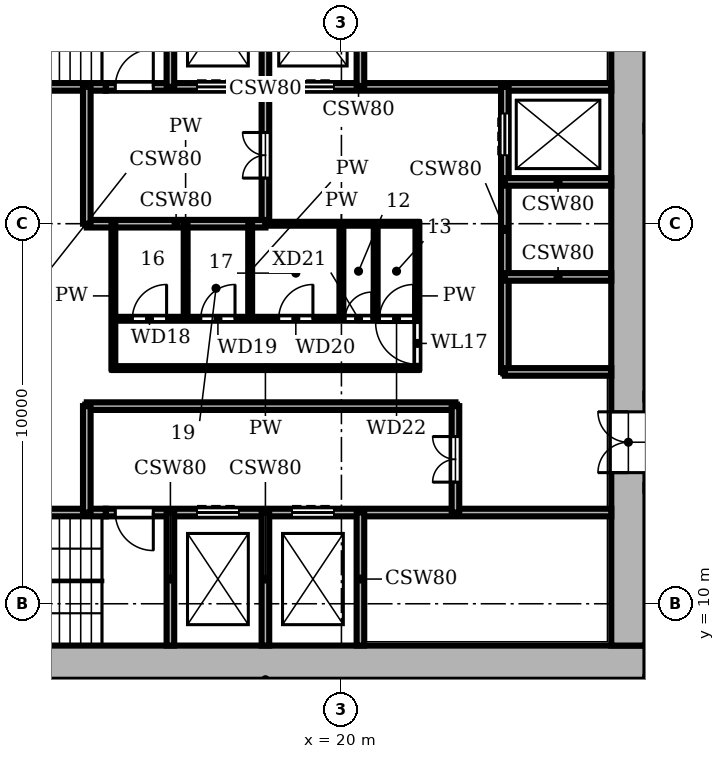
"""IFC4 building model, lengths in metres.
Left out: names, types, materials, properties, quantities, classifications, styles, units other than length and angle.
Written with IfcOpenShell. Run it as: python <this file> out.ifc"""

import sys

from ifc_helpers import new_model, si_unit, direction, frame, frame_2d, origin, place, context, subcontext, project, spatial, rectangle, extrude, element, fill, save


model = new_model("IFC4")
c1 = context("Model", 3, precision=1e-05, world=origin(), true_north=direction((0.0, 1.0)))
c2 = subcontext(c1, "Body", "Model", "MODEL_VIEW")
j1 = project(units=[si_unit("LENGTHUNIT", "METRE"), si_unit("PLANEANGLEUNIT", "RADIAN")], contexts=[c1])
p1 = place(None, origin())
s1 = spatial("IfcSite", under=j1, at=p1, CompositionType="ELEMENT")
p2 = place(p1, origin())
s2 = spatial("IfcBuilding", under=s1, at=p2, CompositionType="ELEMENT")
p3 = place(p2, frame((0.0, 0.0, 86.1)))
s3 = spatial("IfcBuildingStorey", under=s2, at=p3, CompositionType="ELEMENT", Elevation=86.1)
p4 = place(p3, frame((8.0, 8.45, 0.0), z_axis=(0.0, 0.0, 1.0), x_axis=(1.0, 0.0, 0.0)))
e1 = element("IfcWall", 1, at=p4, inside=s3, PredefinedType="SHEAR", context=c2, shape_type="SweptSolid", body=[
    extrude(rectangle(XDim=20.0, YDim=0.9, at=frame_2d((10.0, 0.0))), origin(), (0.0, 0.0, 1.0), 3.9),
])
p5 = place(p3, frame((27.55, 8.9, 0.0), z_axis=(0.0, 0.0, 1.0), x_axis=(0.0, 1.0, 0.0)))
e2 = element("IfcWall", 2, at=p5, inside=s3, PredefinedType="SHEAR", context=c2, shape_type="SweptSolid", body=[
    extrude(rectangle(XDim=18.2, YDim=0.9, at=frame_2d((9.1, 0.0))), origin(), (0.0, 0.0, 1.0), 3.9),
])
p6 = place(p5, frame((4.55, 0.0, 0.0)))
e3 = element("IfcOpeningElement", 3, at=p6, cuts=e2, PredefinedType="OPENING", context=c2, shape_type="SweptSolid", body=[
    extrude(rectangle(XDim=1.6, YDim=2.1, at=frame_2d((0.8, 1.05))), frame((0.0, 0.46, 0.0), z_axis=(0.0, -1.0, 0.0), x_axis=(1.0, 0.0, 0.0)), (0.0, 0.0, 1.0), 0.92),
])
p7 = place(p3, frame((8.9, 12.4, 0.0), z_axis=(0.0, 0.0, 1.0), x_axis=(1.0, 0.0, 0.0)))
e4 = element("IfcWall", 4, at=p7, inside=s3, PredefinedType="SHEAR", context=c2, shape_type="SweptSolid", body=[
    extrude(rectangle(XDim=4.9, YDim=0.2, at=frame_2d((2.45, 0.0))), origin(), (0.0, 0.0, 1.0), 3.58),
])
p8 = place(p3, frame((13.8, 12.4, 0.0), z_axis=(0.0, 0.0, 1.0), x_axis=(1.0, 0.0, 0.0)))
e5 = element("IfcWall", 5, at=p8, inside=s3, PredefinedType="SHEAR", context=c2, shape_type="SweptSolid", body=[
    extrude(rectangle(XDim=13.3, YDim=0.2, at=frame_2d((6.65, 0.0))), origin(), (0.0, 0.0, 1.0), 3.58),
])
p9 = place(p8, frame((2.4, 0.0, 0.0)))
e6 = element("IfcOpeningElement", 6, at=p9, cuts=e5, PredefinedType="OPENING", context=c2, shape_type="SweptSolid", body=[
    extrude(rectangle(XDim=1.1, YDim=2.1, at=frame_2d((0.55, 1.05))), frame((0.0, 0.11, 0.0), z_axis=(0.0, -1.0, 0.0), x_axis=(1.0, 0.0, 0.0)), (0.0, 0.0, 1.0), 0.22),
])
p10 = place(p8, frame((4.9, 0.0, 0.0)))
e7 = element("IfcOpeningElement", 7, at=p10, cuts=e5, PredefinedType="OPENING", context=c2, shape_type="SweptSolid", body=[
    extrude(rectangle(XDim=1.1, YDim=2.1, at=frame_2d((0.55, 1.05))), frame((0.0, 0.11, 0.0), z_axis=(0.0, -1.0, 0.0), x_axis=(1.0, 0.0, 0.0)), (0.0, 0.0, 1.0), 0.22),
])
p11 = place(p8, frame((0.25, 0.0, 0.0)))
e8 = element("IfcOpeningElement", 8, at=p11, cuts=e5, PredefinedType="OPENING", context=c2, shape_type="SweptSolid", body=[
    extrude(rectangle(XDim=1.0, YDim=2.1, at=frame_2d((0.5, 1.05))), frame((0.0, 0.11, 0.0), z_axis=(0.0, -1.0, 0.0), x_axis=(1.0, 0.0, 0.0)), (0.0, 0.0, 1.0), 0.22),
])
p12 = place(p3, frame((13.3, 15.2, 0.0), z_axis=(0.0, 0.0, 1.0), x_axis=(1.0, 0.0, 0.0)))
e9 = element("IfcWall", 9, at=p12, inside=s3, PredefinedType="SHEAR", context=c2, shape_type="SweptSolid", body=[
    extrude(rectangle(XDim=9.7, YDim=0.2, at=frame_2d((4.85, 0.0))), origin(), (0.0, 0.0, 1.0), 3.58),
])
p13 = place(p3, frame((24.3, 16.1, 0.0), z_axis=(0.0, 0.0, 1.0), x_axis=(1.0, 0.0, 0.0)))
e10 = element("IfcWall", 10, at=p13, inside=s3, PredefinedType="SHEAR", context=c2, shape_type="SweptSolid", body=[
    extrude(rectangle(XDim=2.8, YDim=0.2, at=frame_2d((1.4, 0.0))), origin(), (0.0, 0.0, 1.0), 3.58),
])
p14 = place(p3, frame((14.0, 16.2, 0.0), z_axis=(0.0, 0.0, 1.0), x_axis=(1.0, 0.0, 0.0)))
e11 = element("IfcWall", 11, at=p14, inside=s3, PredefinedType="PARTITIONING", context=c2, shape_type="SweptSolid", body=[
    extrude(rectangle(XDim=8.0, YDim=0.1, at=frame_2d((4.0, 0.0))), origin(), (0.0, 0.0, 1.0), 3.58),
])
p15 = place(p3, frame((14.0, 17.5, 0.0), z_axis=(0.0, 0.0, 1.0), x_axis=(1.0, 0.0, 0.0)))
e12 = element("IfcWall", 12, at=p15, inside=s3, PredefinedType="PARTITIONING", context=c2, shape_type="SweptSolid", body=[
    extrude(rectangle(XDim=8.0, YDim=0.1, at=frame_2d((4.0, 0.0))), origin(), (0.0, 0.0, 1.0), 3.58),
])
p16 = place(p15, frame((0.5, 0.0, 0.0)))
e13 = element("IfcOpeningElement", 13, at=p16, cuts=e12, PredefinedType="OPENING", context=c2, shape_type="SweptSolid", body=[
    extrude(rectangle(XDim=0.9, YDim=2.1, at=frame_2d((0.45, 1.05))), frame((0.0, 0.06, 0.0), z_axis=(0.0, -1.0, 0.0), x_axis=(1.0, 0.0, 0.0)), (0.0, 0.0, 1.0), 0.12),
])
p17 = place(p15, frame((2.3, 0.0, 0.0)))
e14 = element("IfcOpeningElement", 14, at=p17, cuts=e12, PredefinedType="OPENING", context=c2, shape_type="SweptSolid", body=[
    extrude(rectangle(XDim=0.9, YDim=2.1, at=frame_2d((0.45, 1.05))), frame((0.0, 0.06, 0.0), z_axis=(0.0, -1.0, 0.0), x_axis=(1.0, 0.0, 0.0)), (0.0, 0.0, 1.0), 0.12),
])
p18 = place(p15, frame((4.35, 0.0, 0.0)))
e15 = element("IfcOpeningElement", 15, at=p18, cuts=e12, PredefinedType="OPENING", context=c2, shape_type="SweptSolid", body=[
    extrude(rectangle(XDim=0.9, YDim=2.1, at=frame_2d((0.45, 1.05))), frame((0.0, 0.06, 0.0), z_axis=(0.0, -1.0, 0.0), x_axis=(1.0, 0.0, 0.0)), (0.0, 0.0, 1.0), 0.12),
])
p19 = place(p15, frame((6.1, 0.0, 0.0)))
e16 = element("IfcOpeningElement", 16, at=p19, cuts=e12, PredefinedType="OPENING", context=c2, shape_type="SweptSolid", body=[
    extrude(rectangle(XDim=0.7, YDim=2.1, at=frame_2d((0.35, 1.05))), frame((0.0, 0.06, 0.0), z_axis=(0.0, -1.0, 0.0), x_axis=(1.0, 0.0, 0.0)), (0.0, 0.0, 1.0), 0.12),
])
p20 = place(p15, frame((7.0, 0.0, 0.0)))
e17 = element("IfcOpeningElement", 17, at=p20, cuts=e12, PredefinedType="OPENING", context=c2, shape_type="SweptSolid", body=[
    extrude(rectangle(XDim=0.9, YDim=2.1, at=frame_2d((0.45, 1.05))), frame((0.0, 0.06, 0.0), z_axis=(0.0, -1.0, 0.0), x_axis=(1.0, 0.0, 0.0)), (0.0, 0.0, 1.0), 0.12),
])
p21 = place(p3, frame((24.3, 18.6, 0.0), z_axis=(0.0, 0.0, 1.0), x_axis=(1.0, 0.0, 0.0)))
e18 = element("IfcWall", 18, at=p21, inside=s3, PredefinedType="SHEAR", context=c2, shape_type="SweptSolid", body=[
    extrude(rectangle(XDim=2.8, YDim=0.2, at=frame_2d((1.4, 0.0))), origin(), (0.0, 0.0, 1.0), 3.58),
])
p22 = place(p3, frame((18.0, 20.0, 0.0), z_axis=(0.0, 0.0, 1.0), x_axis=(1.0, 0.0, 0.0)))
e19 = element("IfcWall", 19, at=p22, inside=s3, PredefinedType="PARTITIONING", context=c2, shape_type="SweptSolid", body=[
    extrude(rectangle(XDim=4.0, YDim=0.1, at=frame_2d((2.0, 0.0))), origin(), (0.0, 0.0, 1.0), 3.58),
])
p23 = place(p3, frame((13.3, 20.0, 0.0), z_axis=(0.0, 0.0, 1.0), x_axis=(1.0, 0.0, 0.0)))
e20 = element("IfcWall", 20, at=p23, inside=s3, PredefinedType="SHEAR", context=c2, shape_type="SweptSolid", body=[
    extrude(rectangle(XDim=4.7, YDim=0.2, at=frame_2d((2.35, 0.0))), origin(), (0.0, 0.0, 1.0), 3.58),
])
p24 = place(p3, frame((24.3, 21.1, 0.0), z_axis=(0.0, 0.0, 1.0), x_axis=(1.0, 0.0, 0.0)))
e21 = element("IfcWall", 21, at=p24, inside=s3, PredefinedType="SHEAR", context=c2, shape_type="SweptSolid", body=[
    extrude(rectangle(XDim=2.8, YDim=0.2, at=frame_2d((1.4, 0.0))), origin(), (0.0, 0.0, 1.0), 3.58),
])
p25 = place(p3, frame((8.9, 23.6, 0.0), z_axis=(0.0, 0.0, 1.0), x_axis=(1.0, 0.0, 0.0)))
e22 = element("IfcWall", 22, at=p25, inside=s3, PredefinedType="SHEAR", context=c2, shape_type="SweptSolid", body=[
    extrude(rectangle(XDim=4.9, YDim=0.2, at=frame_2d((2.45, 0.0))), origin(), (0.0, 0.0, 1.0), 3.58),
])
p26 = place(p3, frame((13.8, 23.6, 0.0), z_axis=(0.0, 0.0, 1.0), x_axis=(1.0, 0.0, 0.0)))
e23 = element("IfcWall", 23, at=p26, inside=s3, PredefinedType="SHEAR", context=c2, shape_type="SweptSolid", body=[
    extrude(rectangle(XDim=13.3, YDim=0.2, at=frame_2d((6.65, 0.0))), origin(), (0.0, 0.0, 1.0), 3.58),
])
p27 = place(p26, frame((2.4, 0.0, 0.0)))
e24 = element("IfcOpeningElement", 24, at=p27, cuts=e23, PredefinedType="OPENING", context=c2, shape_type="SweptSolid", body=[
    extrude(rectangle(XDim=1.1, YDim=2.1, at=frame_2d((0.55, 1.05))), frame((0.0, 0.11, 0.0), z_axis=(0.0, -1.0, 0.0), x_axis=(1.0, 0.0, 0.0)), (0.0, 0.0, 1.0), 0.22),
])
p28 = place(p26, frame((4.9, 0.0, 0.0)))
e25 = element("IfcOpeningElement", 25, at=p28, cuts=e23, PredefinedType="OPENING", context=c2, shape_type="SweptSolid", body=[
    extrude(rectangle(XDim=1.1, YDim=2.1, at=frame_2d((0.55, 1.05))), frame((0.0, 0.11, 0.0), z_axis=(0.0, -1.0, 0.0), x_axis=(1.0, 0.0, 0.0)), (0.0, 0.0, 1.0), 0.22),
])
p29 = place(p26, frame((0.25, 0.0, 0.0)))
e26 = element("IfcOpeningElement", 26, at=p29, cuts=e23, PredefinedType="OPENING", context=c2, shape_type="SweptSolid", body=[
    extrude(rectangle(XDim=1.0, YDim=2.1, at=frame_2d((0.5, 1.05))), frame((0.0, 0.11, 0.0), z_axis=(0.0, -1.0, 0.0), x_axis=(1.0, 0.0, 0.0)), (0.0, 0.0, 1.0), 0.22),
])
p30 = place(p3, frame((13.3, 12.4, 0.0), z_axis=(0.0, 0.0, 1.0), x_axis=(0.0, 1.0, 0.0)))
e27 = element("IfcWall", 27, at=p30, inside=s3, PredefinedType="SHEAR", context=c2, shape_type="SweptSolid", body=[
    extrude(rectangle(XDim=2.8, YDim=0.2, at=frame_2d((1.4, 0.0))), origin(), (0.0, 0.0, 1.0), 3.58),
])
p31 = place(p3, frame((13.3, 20.0, 0.0), z_axis=(0.0, 0.0, 1.0), x_axis=(0.0, 1.0, 0.0)))
e28 = element("IfcWall", 28, at=p31, inside=s3, PredefinedType="SHEAR", context=c2, shape_type="SweptSolid", body=[
    extrude(rectangle(XDim=3.6, YDim=0.2, at=frame_2d((1.8, 0.0))), origin(), (0.0, 0.0, 1.0), 3.58),
])
p32 = place(p3, frame((14.0, 16.2, 0.0), z_axis=(0.0, 0.0, 1.0), x_axis=(0.0, 1.0, 0.0)))
e29 = element("IfcWall", 29, at=p32, inside=s3, PredefinedType="PARTITIONING", context=c2, shape_type="SweptSolid", body=[
    extrude(rectangle(XDim=3.8, YDim=0.1, at=frame_2d((1.9, 0.0))), origin(), (0.0, 0.0, 1.0), 3.58),
])
for number, where, z_axis, x_axis in (
    (30, (15.5, 8.9, 0.0), (0.0, 0.0, 1.0), (0.0, 1.0, 0.0)),
    (31, (15.5, 23.6, 0.0), (0.0, 0.0, 1.0), (0.0, 1.0, 0.0)),
):
    element("IfcWall", number, at=place(p3, frame(where, z_axis=z_axis, x_axis=x_axis)), inside=s3, PredefinedType="SHEAR", context=c2, shape_type="SweptSolid", body=[
        extrude(rectangle(XDim=3.5, YDim=0.2, at=frame_2d((1.75, 0.0))), origin(), (0.0, 0.0, 1.0), 3.58),
    ])
for number, where, z_axis, x_axis in (
    (32, (15.9, 17.5, 0.0), (0.0, 0.0, 1.0), (0.0, 1.0, 0.0)),
    (33, (17.6, 17.5, 0.0), (0.0, 0.0, 1.0), (0.0, 1.0, 0.0)),
):
    element("IfcWall", number, at=place(p3, frame(where, z_axis=z_axis, x_axis=x_axis)), inside=s3, PredefinedType="PARTITIONING", context=c2, shape_type="SweptSolid", body=[
        extrude(rectangle(XDim=2.5, YDim=0.1, at=frame_2d((1.25, 0.0))), origin(), (0.0, 0.0, 1.0), 3.58),
    ])
p33 = place(p3, frame((18.0, 8.9, 0.0), z_axis=(0.0, 0.0, 1.0), x_axis=(0.0, 1.0, 0.0)))
e34 = element("IfcWall", 34, at=p33, inside=s3, PredefinedType="SHEAR", context=c2, shape_type="SweptSolid", body=[
    extrude(rectangle(XDim=3.5, YDim=0.2, at=frame_2d((1.75, 0.0))), origin(), (0.0, 0.0, 1.0), 3.58),
])
p34 = place(p3, frame((18.0, 20.0, 0.0), z_axis=(0.0, 0.0, 1.0), x_axis=(0.0, 1.0, 0.0)))
e35 = element("IfcWall", 35, at=p34, inside=s3, PredefinedType="SHEAR", context=c2, shape_type="SweptSolid", body=[
    extrude(rectangle(XDim=7.1, YDim=0.2, at=frame_2d((3.55, 0.0))), origin(), (0.0, 0.0, 1.0), 3.58),
])
p35 = place(p34, frame((1.2, 0.0, 0.0)))
e36 = element("IfcOpeningElement", 36, at=p35, cuts=e35, PredefinedType="OPENING", context=c2, shape_type="SweptSolid", body=[
    extrude(rectangle(XDim=1.2, YDim=2.1, at=frame_2d((0.6, 1.05))), frame((0.0, 0.11, 0.0), z_axis=(0.0, -1.0, 0.0), x_axis=(1.0, 0.0, 0.0)), (0.0, 0.0, 1.0), 0.22),
])
p36 = place(p3, frame((20.0, 17.5, 0.0), z_axis=(0.0, 0.0, 1.0), x_axis=(0.0, 1.0, 0.0)))
e37 = element("IfcWall", 37, at=p36, inside=s3, PredefinedType="PARTITIONING", context=c2, shape_type="SweptSolid", body=[
    extrude(rectangle(XDim=2.5, YDim=0.1, at=frame_2d((1.25, 0.0))), origin(), (0.0, 0.0, 1.0), 3.58),
])
for number, where, z_axis, x_axis in (
    (38, (20.5, 8.9, 0.0), (0.0, 0.0, 1.0), (0.0, 1.0, 0.0)),
    (39, (20.5, 23.6, 0.0), (0.0, 0.0, 1.0), (0.0, 1.0, 0.0)),
):
    element("IfcWall", number, at=place(p3, frame(where, z_axis=z_axis, x_axis=x_axis)), inside=s3, PredefinedType="SHEAR", context=c2, shape_type="SweptSolid", body=[
        extrude(rectangle(XDim=3.5, YDim=0.2, at=frame_2d((1.75, 0.0))), origin(), (0.0, 0.0, 1.0), 3.58),
    ])
p37 = place(p3, frame((20.9, 17.5, 0.0), z_axis=(0.0, 0.0, 1.0), x_axis=(0.0, 1.0, 0.0)))
e40 = element("IfcWall", 40, at=p37, inside=s3, PredefinedType="PARTITIONING", context=c2, shape_type="SweptSolid", body=[
    extrude(rectangle(XDim=2.5, YDim=0.1, at=frame_2d((1.25, 0.0))), origin(), (0.0, 0.0, 1.0), 3.58),
])
p38 = place(p3, frame((22.0, 16.2, 0.0), z_axis=(0.0, 0.0, 1.0), x_axis=(0.0, 1.0, 0.0)))
e41 = element("IfcWall", 41, at=p38, inside=s3, PredefinedType="PARTITIONING", context=c2, shape_type="SweptSolid", body=[
    extrude(rectangle(XDim=3.8, YDim=0.1, at=frame_2d((1.9, 0.0))), origin(), (0.0, 0.0, 1.0), 3.58),
])
p39 = place(p38, frame((0.1, 0.0, 0.0)))
e42 = element("IfcOpeningElement", 42, at=p39, cuts=e41, PredefinedType="OPENING", context=c2, shape_type="SweptSolid", body=[
    extrude(rectangle(XDim=1.1, YDim=2.1, at=frame_2d((0.55, 1.05))), frame((0.0, 0.06, 0.0), z_axis=(0.0, -1.0, 0.0), x_axis=(1.0, 0.0, 0.0)), (0.0, 0.0, 1.0), 0.12),
])
p40 = place(p3, frame((23.0, 12.4, 0.0), z_axis=(0.0, 0.0, 1.0), x_axis=(0.0, 1.0, 0.0)))
e43 = element("IfcWall", 43, at=p40, inside=s3, PredefinedType="SHEAR", context=c2, shape_type="SweptSolid", body=[
    extrude(rectangle(XDim=2.8, YDim=0.2, at=frame_2d((1.4, 0.0))), origin(), (0.0, 0.0, 1.0), 3.58),
])
p41 = place(p40, frame((0.8, 0.0, 0.0)))
e44 = element("IfcOpeningElement", 44, at=p41, cuts=e43, PredefinedType="OPENING", context=c2, shape_type="SweptSolid", body=[
    extrude(rectangle(XDim=1.2, YDim=2.1, at=frame_2d((0.6, 1.05))), frame((0.0, 0.11, 0.0), z_axis=(0.0, -1.0, 0.0), x_axis=(1.0, 0.0, 0.0)), (0.0, 0.0, 1.0), 0.22),
])
p42 = place(p3, frame((24.3, 16.1, 0.0), z_axis=(0.0, 0.0, 1.0), x_axis=(0.0, 1.0, 0.0)))
e45 = element("IfcWall", 45, at=p42, inside=s3, PredefinedType="SHEAR", context=c2, shape_type="SweptSolid", body=[
    extrude(rectangle(XDim=7.5, YDim=0.2, at=frame_2d((3.75, 0.0))), origin(), (0.0, 0.0, 1.0), 3.58),
])
p43 = place(p42, frame((5.7, 0.0, 0.0)))
e46 = element("IfcOpeningElement", 46, at=p43, cuts=e45, PredefinedType="OPENING", context=c2, shape_type="SweptSolid", body=[
    extrude(rectangle(XDim=1.1, YDim=2.1, at=frame_2d((0.55, 1.05))), frame((0.0, 0.11, 0.0), z_axis=(0.0, -1.0, 0.0), x_axis=(1.0, 0.0, 0.0)), (0.0, 0.0, 1.0), 0.22),
])
for number, where, z_axis, x_axis in (
    (47, (28.0, 15.45, 0.0), (0.0, 0.0, 1.0), (1.0, 0.0, 0.0)),
    (48, (28.0, 22.5, 0.0), (0.0, 0.0, 1.0), (1.0, 0.0, 0.0)),
):
    element("IfcWall", number, at=place(p3, frame(where, z_axis=z_axis, x_axis=x_axis)), inside=s3, PredefinedType="PARTITIONING", context=c2, shape_type="SweptSolid", body=[
        extrude(rectangle(XDim=2.8, YDim=0.15, at=frame_2d((1.4, 0.0))), origin(), (0.0, 0.0, 1.0), 3.58),
    ])
p44 = place(p43, origin())
e49 = element("IfcDoor", 49, at=p44, inside=s3, OperationType="DOUBLE_DOOR_SLIDING", PredefinedType="DOOR", context=c2, shape_type="SweptSolid", body=[
    extrude(rectangle(XDim=1.1, YDim=2.1, at=frame_2d((0.55, 1.05))), frame((0.0, 0.025, 0.0), z_axis=(0.0, -1.0, 0.0), x_axis=(1.0, 0.0, 0.0)), (0.0, 0.0, 1.0), 0.05),
])
fill(e46, e49)
p45 = place(p9, origin())
e50 = element("IfcDoor", 50, at=p45, inside=s3, OperationType="DOUBLE_DOOR_SLIDING", PredefinedType="DOOR", context=c2, shape_type="SweptSolid", body=[
    extrude(rectangle(XDim=1.1, YDim=2.1, at=frame_2d((0.55, 1.05))), frame((0.0, 0.025, 0.0), z_axis=(0.0, -1.0, 0.0), x_axis=(1.0, 0.0, 0.0)), (0.0, 0.0, 1.0), 0.05),
])
fill(e6, e50)
p46 = place(p10, origin())
e51 = element("IfcDoor", 51, at=p46, inside=s3, OperationType="DOUBLE_DOOR_SLIDING", PredefinedType="DOOR", context=c2, shape_type="SweptSolid", body=[
    extrude(rectangle(XDim=1.1, YDim=2.1, at=frame_2d((0.55, 1.05))), frame((0.0, 0.025, 0.0), z_axis=(0.0, -1.0, 0.0), x_axis=(1.0, 0.0, 0.0)), (0.0, 0.0, 1.0), 0.05),
])
fill(e7, e51)
p47 = place(p27, origin())
e52 = element("IfcDoor", 52, at=p47, inside=s3, OperationType="DOUBLE_DOOR_SLIDING", PredefinedType="DOOR", context=c2, shape_type="SweptSolid", body=[
    extrude(rectangle(XDim=1.1, YDim=2.1, at=frame_2d((0.55, 1.05))), frame((0.0, 0.025, 0.0), z_axis=(0.0, -1.0, 0.0), x_axis=(1.0, 0.0, 0.0)), (0.0, 0.0, 1.0), 0.05),
])
fill(e24, e52)
p48 = place(p28, origin())
e53 = element("IfcDoor", 53, at=p48, inside=s3, OperationType="DOUBLE_DOOR_SLIDING", PredefinedType="DOOR", context=c2, shape_type="SweptSolid", body=[
    extrude(rectangle(XDim=1.1, YDim=2.1, at=frame_2d((0.55, 1.05))), frame((0.0, 0.025, 0.0), z_axis=(0.0, -1.0, 0.0), x_axis=(1.0, 0.0, 0.0)), (0.0, 0.0, 1.0), 0.05),
])
fill(e25, e53)
p49 = place(p11, frame((1.0, 0.0, 0.0), z_axis=(0.0, 0.0, 1.0), x_axis=(-1.0, 0.0, 0.0)))
e54 = element("IfcDoor", 54, at=p49, inside=s3, OperationType="SINGLE_SWING_LEFT", PredefinedType="DOOR", context=c2, shape_type="SweptSolid", body=[
    extrude(rectangle(XDim=1.0, YDim=2.1, at=frame_2d((0.5, 1.05))), frame((0.0, 0.025, 0.0), z_axis=(0.0, -1.0, 0.0), x_axis=(1.0, 0.0, 0.0)), (0.0, 0.0, 1.0), 0.05),
])
fill(e8, e54)
p50 = place(p29, origin())
e55 = element("IfcDoor", 55, at=p50, inside=s3, OperationType="SINGLE_SWING_RIGHT", PredefinedType="DOOR", context=c2, shape_type="SweptSolid", body=[
    extrude(rectangle(XDim=1.0, YDim=2.1, at=frame_2d((0.5, 1.05))), frame((0.0, 0.025, 0.0), z_axis=(0.0, -1.0, 0.0), x_axis=(1.0, 0.0, 0.0)), (0.0, 0.0, 1.0), 0.05),
])
fill(e26, e55)
p51 = place(p41, origin())
e56 = element("IfcDoor", 56, at=p51, inside=s3, OperationType="DOUBLE_DOOR_SINGLE_SWING", PredefinedType="DOOR", context=c2, shape_type="SweptSolid", body=[
    extrude(rectangle(XDim=1.2, YDim=2.1, at=frame_2d((0.6, 1.05))), frame((0.0, 0.025, 0.0), z_axis=(0.0, -1.0, 0.0), x_axis=(1.0, 0.0, 0.0)), (0.0, 0.0, 1.0), 0.05),
])
fill(e44, e56)
p52 = place(p35, origin())
e57 = element("IfcDoor", 57, at=p52, inside=s3, OperationType="DOUBLE_DOOR_SINGLE_SWING", PredefinedType="DOOR", context=c2, shape_type="SweptSolid", body=[
    extrude(rectangle(XDim=1.2, YDim=2.1, at=frame_2d((0.6, 1.05))), frame((0.0, 0.025, 0.0), z_axis=(0.0, -1.0, 0.0), x_axis=(1.0, 0.0, 0.0)), (0.0, 0.0, 1.0), 0.05),
])
fill(e36, e57)
p53 = place(p39, origin())
e58 = element("IfcDoor", 58, at=p53, inside=s3, OperationType="SINGLE_SWING_RIGHT", PredefinedType="DOOR", context=c2, shape_type="SweptSolid", body=[
    extrude(rectangle(XDim=1.1, YDim=2.1, at=frame_2d((0.55, 1.05))), frame((0.0, 0.025, 0.0), z_axis=(0.0, -1.0, 0.0), x_axis=(1.0, 0.0, 0.0)), (0.0, 0.0, 1.0), 0.05),
])
fill(e42, e58)
p54 = place(p16, origin())
e59 = element("IfcDoor", 59, at=p54, inside=s3, OperationType="SINGLE_SWING_RIGHT", PredefinedType="DOOR", context=c2, shape_type="SweptSolid", body=[
    extrude(rectangle(XDim=0.9, YDim=2.1, at=frame_2d((0.45, 1.05))), frame((0.0, 0.025, 0.0), z_axis=(0.0, -1.0, 0.0), x_axis=(1.0, 0.0, 0.0)), (0.0, 0.0, 1.0), 0.05),
])
fill(e13, e59)
p55 = place(p17, origin())
e60 = element("IfcDoor", 60, at=p55, inside=s3, OperationType="SINGLE_SWING_RIGHT", PredefinedType="DOOR", context=c2, shape_type="SweptSolid", body=[
    extrude(rectangle(XDim=0.9, YDim=2.1, at=frame_2d((0.45, 1.05))), frame((0.0, 0.025, 0.0), z_axis=(0.0, -1.0, 0.0), x_axis=(1.0, 0.0, 0.0)), (0.0, 0.0, 1.0), 0.05),
])
fill(e14, e60)
p56 = place(p18, origin())
e61 = element("IfcDoor", 61, at=p56, inside=s3, OperationType="SINGLE_SWING_RIGHT", PredefinedType="DOOR", context=c2, shape_type="SweptSolid", body=[
    extrude(rectangle(XDim=0.9, YDim=2.1, at=frame_2d((0.45, 1.05))), frame((0.0, 0.025, 0.0), z_axis=(0.0, -1.0, 0.0), x_axis=(1.0, 0.0, 0.0)), (0.0, 0.0, 1.0), 0.05),
])
fill(e15, e61)
p57 = place(p19, origin())
e62 = element("IfcDoor", 62, at=p57, inside=s3, OperationType="SINGLE_SWING_RIGHT", PredefinedType="DOOR", context=c2, shape_type="SweptSolid", body=[
    extrude(rectangle(XDim=0.7, YDim=2.1, at=frame_2d((0.35, 1.05))), frame((0.0, 0.025, 0.0), z_axis=(0.0, -1.0, 0.0), x_axis=(1.0, 0.0, 0.0)), (0.0, 0.0, 1.0), 0.05),
])
fill(e16, e62)
p58 = place(p20, origin())
e63 = element("IfcDoor", 63, at=p58, inside=s3, OperationType="SINGLE_SWING_RIGHT", PredefinedType="DOOR", context=c2, shape_type="SweptSolid", body=[
    extrude(rectangle(XDim=0.9, YDim=2.1, at=frame_2d((0.45, 1.05))), frame((0.0, 0.025, 0.0), z_axis=(0.0, -1.0, 0.0), x_axis=(1.0, 0.0, 0.0)), (0.0, 0.0, 1.0), 0.05),
])
fill(e17, e63)
p59 = place(p6, origin())
e64 = element("IfcDoor", 64, at=p59, inside=s3, OperationType="DOUBLE_DOOR_SINGLE_SWING", PredefinedType="DOOR", context=c2, shape_type="SweptSolid", body=[
    extrude(rectangle(XDim=1.6, YDim=2.1, at=frame_2d((0.8, 1.05))), frame((0.0, 0.025, 0.0), z_axis=(0.0, -1.0, 0.0), x_axis=(1.0, 0.0, 0.0)), (0.0, 0.0, 1.0), 0.05),
])
fill(e3, e64)
save(model, sys.argv[1])
